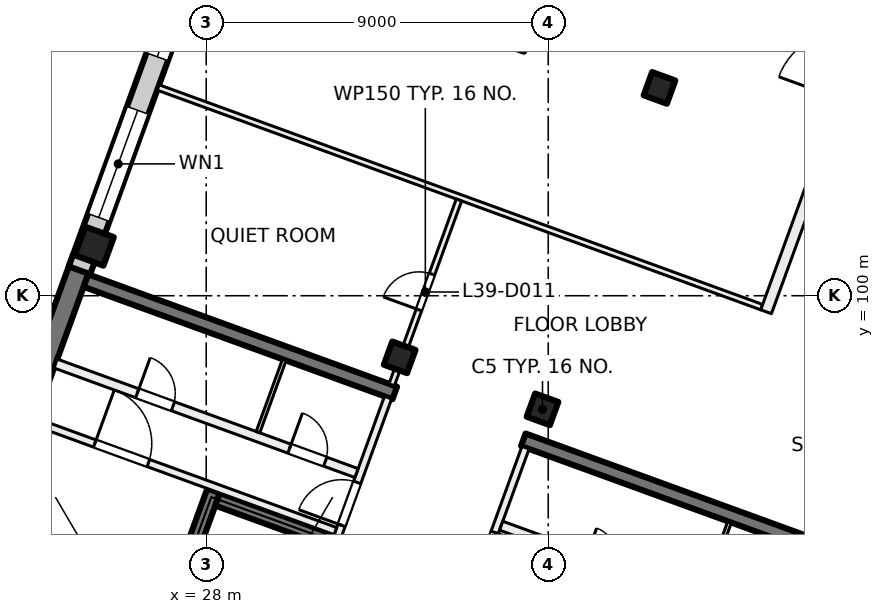
"""IFC4 building model, lengths in metres.
Left out: names, types, materials, properties, quantities, classifications, styles, units other than length and angle.
Written with IfcOpenShell. Run it as: python <this file> out.ifc"""

import sys

from ifc_helpers import new_model, si_unit, direction, frame, frame_2d, origin, origin_2d, place, context, subcontext, project, spatial, rectangle, extrude, element, fill, save


model = new_model("IFC4")
c1 = context("Model", 3, precision=1e-05, world=origin(), true_north=direction((0.0, 1.0)))
c2 = subcontext(c1, "Body", "Model", "MODEL_VIEW")
j1 = project(units=[si_unit("LENGTHUNIT", "METRE"), si_unit("PLANEANGLEUNIT", "RADIAN")], contexts=[c1])
p1 = place(None, origin())
s1 = spatial("IfcSite", under=j1, at=p1, CompositionType="ELEMENT")
p2 = place(p1, origin())
s2 = spatial("IfcBuilding", under=s1, at=p2, CompositionType="ELEMENT")
p3 = place(p2, frame((0.0, 0.0, 166.5)))
s3 = spatial("IfcBuildingStorey", under=s2, at=p3, CompositionType="ELEMENT", Elevation=166.5)
for number, where, z_axis, x_axis in (
    (1, (39.927, 105.468, 0.0), (0.0, 0.0, 1.0), (-0.342, -0.94, 0.0)),
    (2, (36.849, 97.011, 0.0), (0.0, 0.0, 1.0), (-0.342, -0.94, 0.0)),
    (3, (33.091, 98.379, 0.0), (0.0, 0.0, 1.0), (-0.342, -0.94, 0.0)),
):
    element("IfcColumn", number, at=place(p3, frame(where, z_axis=z_axis, x_axis=x_axis)), inside=s3, PredefinedType="COLUMN", context=c2, shape_type="SweptSolid", body=[
        extrude(rectangle(XDim=0.65, YDim=0.65, at=origin_2d()), origin(), (0.0, 0.0, 1.0), 4.0),
    ])
p4 = place(p3, frame((25.056, 101.303, 0.0), z_axis=(0.0, 0.0, 1.0), x_axis=(-0.342020143326, -0.939692620786, 0.0)))
e4 = element("IfcColumn", 4, at=p4, inside=s3, PredefinedType="COLUMN", context=c2, shape_type="SweptSolid", body=[
    extrude(rectangle(XDim=0.8, YDim=0.8, at=origin_2d()), origin(), (0.0, 0.0, 1.0), 4.0),
])
p5 = place(p3, frame((41.85, 85.241, 0.0), z_axis=(0.0, 0.0, 1.0), x_axis=(0.34201902012, 0.939693029598, 0.0)))
e5 = element("IfcWall", 5, at=p5, inside=s3, PredefinedType="SHEAR", context=c2, shape_type="SweptSolid", body=[
    extrude(rectangle(XDim=8.95, YDim=0.55, at=frame_2d((4.475, 0.0))), origin(), (0.0, 0.0, 1.0), 4.0),
])
p6 = place(p3, frame((21.694, 92.577, 0.0), z_axis=(0.0, 0.0, 1.0), x_axis=(0.342010253184, 0.939696220444, 0.0)))
e6 = element("IfcWall", 6, at=p6, inside=s3, PredefinedType="SHEAR", context=c2, shape_type="SweptSolid", body=[
    extrude(rectangle(XDim=8.95, YDim=0.55, at=frame_2d((4.475, 0.0))), origin(), (0.0, 0.0, 1.0), 4.0),
])
p7 = place(p3, frame((27.208, 82.216, 0.0), z_axis=(0.0, 0.0, 1.0), x_axis=(0.34201563943, 0.939694260058, 0.0)))
e7 = element("IfcWall", 7, at=p7, inside=s3, PredefinedType="SHEAR", context=c2, shape_type="SweptSolid", body=[
    extrude(rectangle(XDim=12.225, YDim=0.35, at=frame_2d((6.113, 0.0))), origin(), (0.0, 0.0, 1.0), 4.0),
])
p8 = place(p7, frame((0.7, 0.0, 0.0)))
e8 = element("IfcOpeningElement", 8, at=p8, cuts=e7, PredefinedType="OPENING", context=c2, shape_type="SweptSolid", body=[
    extrude(rectangle(XDim=1.1, YDim=2.1, at=frame_2d((0.55, 1.05))), frame((0.0, 0.185, 0.0), z_axis=(0.0, -1.0, 0.0), x_axis=(1.0, 0.0, 0.0)), (0.0, 0.0, 1.0), 0.37),
])
p9 = place(p7, frame((3.1, 0.0, 0.0)))
e9 = element("IfcOpeningElement", 9, at=p9, cuts=e7, PredefinedType="OPENING", context=c2, shape_type="SweptSolid", body=[
    extrude(rectangle(XDim=1.1, YDim=2.1, at=frame_2d((0.55, 1.05))), frame((0.0, 0.185, 0.0), z_axis=(0.0, -1.0, 0.0), x_axis=(1.0, 0.0, 0.0)), (0.0, 0.0, 1.0), 0.37),
])
p10 = place(p7, frame((5.5, 0.0, 0.0)))
e10 = element("IfcOpeningElement", 10, at=p10, cuts=e7, PredefinedType="OPENING", context=c2, shape_type="SweptSolid", body=[
    extrude(rectangle(XDim=1.1, YDim=2.1, at=frame_2d((0.55, 1.05))), frame((0.0, 0.185, 0.0), z_axis=(0.0, -1.0, 0.0), x_axis=(1.0, 0.0, 0.0)), (0.0, 0.0, 1.0), 0.37),
])
p11 = place(p7, frame((10.3, 0.0, 0.0)))
e11 = element("IfcOpeningElement", 11, at=p11, cuts=e7, PredefinedType="OPENING", context=c2, shape_type="SweptSolid", body=[
    extrude(rectangle(XDim=1.1, YDim=2.1, at=frame_2d((0.55, 1.05))), frame((0.0, 0.185, 0.0), z_axis=(0.0, -1.0, 0.0), x_axis=(1.0, 0.0, 0.0)), (0.0, 0.0, 1.0), 0.37),
])
p12 = place(p3, frame((24.013, 83.379, 0.0), z_axis=(0.0, 0.0, 1.0), x_axis=(0.34201563943, 0.939694260058, 0.0)))
e12 = element("IfcWall", 12, at=p12, inside=s3, PredefinedType="SHEAR", context=c2, shape_type="SweptSolid", body=[
    extrude(rectangle(XDim=12.225, YDim=0.35, at=frame_2d((6.113, 0.0))), origin(), (0.0, 0.0, 1.0), 4.0),
])
p13 = place(p12, frame((7.95, 0.0, 0.0)))
e13 = element("IfcOpeningElement", 13, at=p13, cuts=e12, PredefinedType="OPENING", context=c2, shape_type="SweptSolid", body=[
    extrude(rectangle(XDim=1.1, YDim=2.1, at=frame_2d((0.55, 1.05))), frame((0.0, 0.185, 0.0), z_axis=(0.0, -1.0, 0.0), x_axis=(1.0, 0.0, 0.0)), (0.0, 0.0, 1.0), 0.37),
])
p14 = place(p3, frame((31.165, 93.599, 0.0), z_axis=(0.0, 0.0, 1.0), x_axis=(-0.939683528043, 0.3420451244, 0.0)))
e14 = element("IfcWall", 14, at=p14, inside=s3, PredefinedType="SHEAR", context=c2, shape_type="SweptSolid", body=[
    extrude(rectangle(XDim=3.05, YDim=0.35, at=frame_2d((1.525, 0.0))), origin(), (0.0, 0.0, 1.0), 4.0),
])
p15 = place(p3, frame((44.473, 93.251, 0.0), z_axis=(0.0, 0.0, 1.0), x_axis=(-0.939692847377, 0.34201952077, 0.0)))
e15 = element("IfcWall", 15, at=p15, inside=s3, PredefinedType="SHEAR", context=c2, shape_type="SweptSolid", body=[
    extrude(rectangle(XDim=8.65, YDim=0.35, at=frame_2d((4.325, 0.0))), origin(), (0.0, 0.0, 1.0), 4.0),
])
p16 = place(p3, frame((32.962, 97.441, 0.0), z_axis=(0.0, 0.0, 1.0), x_axis=(-0.939689545667, 0.342028592028, 0.0)))
e16 = element("IfcWall", 16, at=p16, inside=s3, PredefinedType="SHEAR", context=c2, shape_type="SweptSolid", body=[
    extrude(rectangle(XDim=8.65, YDim=0.35, at=frame_2d((4.325, 0.0))), origin(), (0.0, 0.0, 1.0), 4.0),
])
p17 = place(p3, frame((24.666, 100.669, 0.0), z_axis=(0.0, 0.0, 1.0), x_axis=(0.34201964167, 0.939692803373, 0.0)))
e17 = element("IfcWall", 17, at=p17, inside=s3, PredefinedType="SOLIDWALL", context=c2, shape_type="SweptSolid", body=[
    extrude(rectangle(XDim=32.884, YDim=0.6, at=frame_2d((16.442, 0.0))), origin(), (0.0, 0.0, 1.0), 3.625),
])
p18 = place(p17, frame((1.48, 0.0, 0.9)))
e18 = element("IfcOpeningElement", 18, at=p18, cuts=e17, PredefinedType="OPENING", context=c2, shape_type="SweptSolid", body=[
    extrude(rectangle(XDim=3.0, YDim=2.4, at=frame_2d((1.5, 1.2))), frame((0.0, 0.31, 0.0), z_axis=(0.0, -1.0, 0.0), x_axis=(1.0, 0.0, 0.0)), (0.0, 0.0, 1.0), 0.62),
])
p19 = place(p17, frame((5.98, 0.0, 0.9)))
e19 = element("IfcOpeningElement", 19, at=p19, cuts=e17, PredefinedType="OPENING", context=c2, shape_type="SweptSolid", body=[
    extrude(rectangle(XDim=3.0, YDim=2.4, at=frame_2d((1.5, 1.2))), frame((0.0, 0.31, 0.0), z_axis=(0.0, -1.0, 0.0), x_axis=(1.0, 0.0, 0.0)), (0.0, 0.0, 1.0), 0.62),
])
p20 = place(p17, frame((10.48, 0.0, 0.9)))
e20 = element("IfcOpeningElement", 20, at=p20, cuts=e17, PredefinedType="OPENING", context=c2, shape_type="SweptSolid", body=[
    extrude(rectangle(XDim=3.0, YDim=2.4, at=frame_2d((1.5, 1.2))), frame((0.0, 0.31, 0.0), z_axis=(0.0, -1.0, 0.0), x_axis=(1.0, 0.0, 0.0)), (0.0, 0.0, 1.0), 0.62),
])
p21 = place(p17, frame((15.58, 0.0, 0.0)))
e21 = element("IfcOpeningElement", 21, at=p21, cuts=e17, PredefinedType="OPENING", context=c2, shape_type="SweptSolid", body=[
    extrude(rectangle(XDim=1.8, YDim=2.4, at=frame_2d((0.9, 1.2))), frame((0.0, 0.31, 0.0), z_axis=(0.0, -1.0, 0.0), x_axis=(1.0, 0.0, 0.0)), (0.0, 0.0, 1.0), 0.62),
])
p22 = place(p17, frame((19.48, 0.0, 0.9)))
e22 = element("IfcOpeningElement", 22, at=p22, cuts=e17, PredefinedType="OPENING", context=c2, shape_type="SweptSolid", body=[
    extrude(rectangle(XDim=3.0, YDim=2.4, at=frame_2d((1.5, 1.2))), frame((0.0, 0.31, 0.0), z_axis=(0.0, -1.0, 0.0), x_axis=(1.0, 0.0, 0.0)), (0.0, 0.0, 1.0), 0.62),
])
p23 = place(p17, frame((23.98, 0.0, 0.9)))
e23 = element("IfcOpeningElement", 23, at=p23, cuts=e17, PredefinedType="OPENING", context=c2, shape_type="SweptSolid", body=[
    extrude(rectangle(XDim=3.0, YDim=2.4, at=frame_2d((1.5, 1.2))), frame((0.0, 0.31, 0.0), z_axis=(0.0, -1.0, 0.0), x_axis=(1.0, 0.0, 0.0)), (0.0, 0.0, 1.0), 0.62),
])
p24 = place(p17, frame((29.08, 0.0, 0.0)))
e24 = element("IfcOpeningElement", 24, at=p24, cuts=e17, PredefinedType="OPENING", context=c2, shape_type="SweptSolid", body=[
    extrude(rectangle(XDim=1.8, YDim=2.4, at=frame_2d((0.9, 1.2))), frame((0.0, 0.31, 0.0), z_axis=(0.0, -1.0, 0.0), x_axis=(1.0, 0.0, 0.0)), (0.0, 0.0, 1.0), 0.62),
])
p25 = place(p3, frame((31.459, 93.678, 0.0), z_axis=(0.0, 0.0, 1.0), x_axis=(0.341985870128, 0.939705094502, 0.0)))
e25 = element("IfcWall", 25, at=p25, inside=s3, PredefinedType="PARTITIONING", context=c2, shape_type="SweptSolid", body=[
    extrude(rectangle(XDim=3.875, YDim=0.2, at=frame_2d((1.938, 0.0))), origin(), (0.0, 0.0, 1.0), 3.625),
])
p26 = place(p25, frame((0.3, 0.0, 0.0)))
e26 = element("IfcOpeningElement", 26, at=p26, cuts=e25, PredefinedType="OPENING", context=c2, shape_type="SweptSolid", body=[
    extrude(rectangle(XDim=1.2, YDim=2.1, at=frame_2d((0.6, 1.05))), frame((0.0, 0.11, 0.0), z_axis=(0.0, -1.0, 0.0), x_axis=(1.0, 0.0, 0.0)), (0.0, 0.0, 1.0), 0.22),
])
p27 = place(p3, frame((23.483, 96.688, 0.0), z_axis=(0.0, 0.0, 1.0), x_axis=(0.939691007314, -0.342024576271, 0.0)))
e27 = element("IfcWall", 27, at=p27, inside=s3, PredefinedType="PARTITIONING", context=c2, shape_type="SweptSolid", body=[
    extrude(rectangle(XDim=8.425, YDim=0.2, at=frame_2d((4.212, 0.0))), origin(), (0.0, 0.0, 1.0), 3.625),
])
p28 = place(p27, frame((1.688, 0.0, 0.0)))
e28 = element("IfcOpeningElement", 28, at=p28, cuts=e27, PredefinedType="OPENING", context=c2, shape_type="SweptSolid", body=[
    extrude(rectangle(XDim=1.5, YDim=2.1, at=frame_2d((0.75, 1.05))), frame((0.0, 0.11, 0.0), z_axis=(0.0, -1.0, 0.0), x_axis=(1.0, 0.0, 0.0)), (0.0, 0.0, 1.0), 0.22),
])
p29 = place(p3, frame((24.039, 98.215, 0.0), z_axis=(0.0, 0.0, 1.0), x_axis=(0.939687617333, -0.342033889887, 0.0)))
e29 = element("IfcWall", 29, at=p29, inside=s3, PredefinedType="PARTITIONING", context=c2, shape_type="SweptSolid", body=[
    extrude(rectangle(XDim=8.425, YDim=0.25, at=frame_2d((4.212, 0.0))), origin(), (0.0, 0.0, 1.0), 3.625),
])
p30 = place(p29, frame((6.548, 0.0, 0.0)))
e30 = element("IfcOpeningElement", 30, at=p30, cuts=e29, PredefinedType="OPENING", context=c2, shape_type="SweptSolid", body=[
    extrude(rectangle(XDim=1.0, YDim=2.1, at=frame_2d((0.5, 1.05))), frame((0.0, 0.135, 0.0), z_axis=(0.0, -1.0, 0.0), x_axis=(1.0, 0.0, 0.0)), (0.0, 0.0, 1.0), 0.27),
])
p31 = place(p29, frame((2.285, 0.0, 0.0)))
e31 = element("IfcOpeningElement", 31, at=p31, cuts=e29, PredefinedType="OPENING", context=c2, shape_type="SweptSolid", body=[
    extrude(rectangle(XDim=1.0, YDim=2.1, at=frame_2d((0.5, 1.05))), frame((0.0, 0.135, 0.0), z_axis=(0.0, -1.0, 0.0), x_axis=(1.0, 0.0, 0.0)), (0.0, 0.0, 1.0), 0.27),
])
p32 = place(p3, frame((29.362, 96.41, 0.0), z_axis=(0.0, 0.0, 1.0), x_axis=(0.342043138314, 0.939684250976, 0.0)))
e32 = element("IfcWall", 32, at=p32, inside=s3, PredefinedType="PARTITIONING", context=c2, shape_type="SweptSolid", body=[
    extrude(rectangle(XDim=2.025, YDim=0.1, at=frame_2d((1.012, 0.0))), origin(), (0.0, 0.0, 1.0), 3.625),
])
p33 = place(p3, frame((36.403, 96.003, 0.0), z_axis=(0.0, 0.0, 1.0), x_axis=(-0.342041503764, -0.939684845947, 0.0)))
e33 = element("IfcWall", 33, at=p33, inside=s3, PredefinedType="PARTITIONING", context=c2, shape_type="SweptSolid", body=[
    extrude(rectangle(XDim=3.875, YDim=0.2, at=frame_2d((1.938, 0.0))), origin(), (0.0, 0.0, 1.0), 3.625),
])
p34 = place(p33, frame((2.375, 0.0, 0.0)))
e34 = element("IfcOpeningElement", 34, at=p34, cuts=e33, PredefinedType="OPENING", context=c2, shape_type="SweptSolid", body=[
    extrude(rectangle(XDim=1.2, YDim=2.1, at=frame_2d((0.6, 1.05))), frame((0.0, 0.11, 0.0), z_axis=(0.0, -1.0, 0.0), x_axis=(1.0, 0.0, 0.0)), (0.0, 0.0, 1.0), 0.22),
])
p35 = place(p3, frame((35.761, 93.948, 0.0), z_axis=(0.0, 0.0, 1.0), x_axis=(0.93969693093, -0.342008301071, 0.0)))
e35 = element("IfcWall", 35, at=p35, inside=s3, PredefinedType="PARTITIONING", context=c2, shape_type="SweptSolid", body=[
    extrude(rectangle(XDim=8.425, YDim=0.25, at=frame_2d((4.212, 0.0))), origin(), (0.0, 0.0, 1.0), 3.625),
])
p36 = place(p35, frame((2.383, 0.0, 0.0)))
e36 = element("IfcOpeningElement", 36, at=p36, cuts=e35, PredefinedType="OPENING", context=c2, shape_type="SweptSolid", body=[
    extrude(rectangle(XDim=0.8, YDim=2.1, at=frame_2d((0.4, 1.05))), frame((0.0, 0.135, 0.0), z_axis=(0.0, -1.0, 0.0), x_axis=(1.0, 0.0, 0.0)), (0.0, 0.0, 1.0), 0.27),
])
p37 = place(p35, frame((6.645, 0.0, 0.0)))
e37 = element("IfcOpeningElement", 37, at=p37, cuts=e35, PredefinedType="OPENING", context=c2, shape_type="SweptSolid", body=[
    extrude(rectangle(XDim=0.8, YDim=2.1, at=frame_2d((0.4, 1.05))), frame((0.0, 0.135, 0.0), z_axis=(0.0, -1.0, 0.0), x_axis=(1.0, 0.0, 0.0)), (0.0, 0.0, 1.0), 0.27),
])
p38 = place(p3, frame((41.773, 94.048, 0.0), z_axis=(0.0, 0.0, 1.0), x_axis=(-0.342043138314, -0.939684250976, 0.0)))
e38 = element("IfcWall", 38, at=p38, inside=s3, PredefinedType="PARTITIONING", context=c2, shape_type="SweptSolid", body=[
    extrude(rectangle(XDim=2.025, YDim=0.1, at=frame_2d((1.012, 0.0))), origin(), (0.0, 0.0, 1.0), 3.625),
])
p39 = place(p3, frame((26.736, 105.48, 0.0), z_axis=(0.0, 0.0, 1.0), x_axis=(0.939695108427, -0.342013308511, 0.0)))
e39 = element("IfcWall", 39, at=p39, inside=s3, PredefinedType="PARTITIONING", context=c2, shape_type="SweptSolid", body=[
    extrude(rectangle(XDim=16.9, YDim=0.15, at=frame_2d((8.45, 0.0))), origin(), (0.0, 0.0, 1.0), 3.625),
])
p40 = place(p3, frame((32.881, 97.657, 0.0), z_axis=(0.0, 0.0, 1.0), x_axis=(0.341981688871, 0.939706616172, 0.0)))
e40 = element("IfcWall", 40, at=p40, inside=s3, PredefinedType="PARTITIONING", context=c2, shape_type="SweptSolid", body=[
    extrude(rectangle(XDim=5.175, YDim=0.15, at=frame_2d((2.587, 0.0))), origin(), (0.0, 0.0, 1.0), 3.625),
])
p41 = place(p40, frame((2.098, 0.0, 0.0)))
e41 = element("IfcOpeningElement", 41, at=p41, cuts=e40, PredefinedType="OPENING", context=c2, shape_type="SweptSolid", body=[
    extrude(rectangle(XDim=1.0, YDim=2.1, at=frame_2d((0.5, 1.05))), frame((0.0, 0.085, 0.0), z_axis=(0.0, -1.0, 0.0), x_axis=(1.0, 0.0, 0.0)), (0.0, 0.0, 1.0), 0.17),
])
p42 = place(p3, frame((42.732, 99.579, 0.0), z_axis=(0.0, 0.0, 1.0), x_axis=(0.342036653044, 0.939686611576, 0.0)))
e42 = element("IfcWall", 42, at=p42, inside=s3, PredefinedType="PARTITIONING", context=c2, shape_type="SweptSolid", body=[
    extrude(rectangle(XDim=23.167, YDim=0.3, at=frame_2d((11.583, 0.0))), origin(), (0.0, 0.0, 1.0), 3.625),
])
p43 = place(p42, frame((15.225, 0.0, 0.0)))
e43 = element("IfcOpeningElement", 43, at=p43, cuts=e42, PredefinedType="OPENING", context=c2, shape_type="SweptSolid", body=[
    extrude(rectangle(XDim=1.2, YDim=2.1, at=frame_2d((0.6, 1.05))), frame((0.0, 0.16, 0.0), z_axis=(0.0, -1.0, 0.0), x_axis=(1.0, 0.0, 0.0)), (0.0, 0.0, 1.0), 0.32),
])
p44 = place(p42, frame((19.725, 0.0, 0.0)))
e44 = element("IfcOpeningElement", 44, at=p44, cuts=e42, PredefinedType="OPENING", context=c2, shape_type="SweptSolid", body=[
    extrude(rectangle(XDim=1.2, YDim=2.1, at=frame_2d((0.6, 1.05))), frame((0.0, 0.16, 0.0), z_axis=(0.0, -1.0, 0.0), x_axis=(1.0, 0.0, 0.0)), (0.0, 0.0, 1.0), 0.32),
])
p45 = place(p42, frame((5.925, 0.0, 0.0)))
e45 = element("IfcOpeningElement", 45, at=p45, cuts=e42, PredefinedType="OPENING", context=c2, shape_type="SweptSolid", body=[
    extrude(rectangle(XDim=1.8, YDim=2.1, at=frame_2d((0.9, 1.05))), frame((0.0, 0.16, 0.0), z_axis=(0.0, -1.0, 0.0), x_axis=(1.0, 0.0, 0.0)), (0.0, 0.0, 1.0), 0.32),
])
p46 = place(p18, origin())
e46 = element("IfcWindow", 46, at=p46, inside=s3, PartitioningType="SINGLE_PANEL", PredefinedType="WINDOW", context=c2, shape_type="SweptSolid", body=[
    extrude(rectangle(XDim=3.0, YDim=2.4, at=frame_2d((1.5, 1.2))), frame((0.0, 0.03, 0.0), z_axis=(0.0, -1.0, 0.0), x_axis=(1.0, 0.0, 0.0)), (0.0, 0.0, 1.0), 0.06),
])
fill(e18, e46)
p47 = place(p19, origin())
e47 = element("IfcWindow", 47, at=p47, inside=s3, PartitioningType="SINGLE_PANEL", PredefinedType="WINDOW", context=c2, shape_type="SweptSolid", body=[
    extrude(rectangle(XDim=3.0, YDim=2.4, at=frame_2d((1.5, 1.2))), frame((0.0, 0.03, 0.0), z_axis=(0.0, -1.0, 0.0), x_axis=(1.0, 0.0, 0.0)), (0.0, 0.0, 1.0), 0.06),
])
fill(e19, e47)
p48 = place(p26, origin())
e48 = element("IfcDoor", 48, at=p48, inside=s3, OperationType="DOUBLE_DOOR_SINGLE_SWING", PredefinedType="DOOR", context=c2, shape_type="SweptSolid", body=[
    extrude(rectangle(XDim=1.2, YDim=2.1, at=frame_2d((0.6, 1.05))), frame((0.0, 0.025, 0.0), z_axis=(0.0, -1.0, 0.0), x_axis=(1.0, 0.0, 0.0)), (0.0, 0.0, 1.0), 0.05),
])
fill(e26, e48)
p49 = place(p28, origin())
e49 = element("IfcDoor", 49, at=p49, inside=s3, OperationType="DOUBLE_DOOR_SINGLE_SWING", PredefinedType="DOOR", context=c2, shape_type="SweptSolid", body=[
    extrude(rectangle(XDim=1.5, YDim=2.1, at=frame_2d((0.75, 1.05))), frame((0.0, 0.025, 0.0), z_axis=(0.0, -1.0, 0.0), x_axis=(1.0, 0.0, 0.0)), (0.0, 0.0, 1.0), 0.05),
])
fill(e28, e49)
p50 = place(p30, origin())
e50 = element("IfcDoor", 50, at=p50, inside=s3, OperationType="SINGLE_SWING_LEFT", PredefinedType="DOOR", context=c2, shape_type="SweptSolid", body=[
    extrude(rectangle(XDim=1.0, YDim=2.1, at=frame_2d((0.5, 1.05))), frame((0.0, 0.025, 0.0), z_axis=(0.0, -1.0, 0.0), x_axis=(1.0, 0.0, 0.0)), (0.0, 0.0, 1.0), 0.05),
])
fill(e30, e50)
p51 = place(p31, origin())
e51 = element("IfcDoor", 51, at=p51, inside=s3, OperationType="SINGLE_SWING_RIGHT", PredefinedType="DOOR", context=c2, shape_type="SweptSolid", body=[
    extrude(rectangle(XDim=1.0, YDim=2.1, at=frame_2d((0.5, 1.05))), frame((0.0, 0.025, 0.0), z_axis=(0.0, -1.0, 0.0), x_axis=(1.0, 0.0, 0.0)), (0.0, 0.0, 1.0), 0.05),
])
fill(e31, e51)
p52 = place(p34, origin())
e52 = element("IfcDoor", 52, at=p52, inside=s3, OperationType="DOUBLE_DOOR_SINGLE_SWING", PredefinedType="DOOR", context=c2, shape_type="SweptSolid", body=[
    extrude(rectangle(XDim=1.2, YDim=2.1, at=frame_2d((0.6, 1.05))), frame((0.0, 0.025, 0.0), z_axis=(0.0, -1.0, 0.0), x_axis=(1.0, 0.0, 0.0)), (0.0, 0.0, 1.0), 0.05),
])
fill(e34, e52)
p53 = place(p41, origin())
e53 = element("IfcDoor", 53, at=p53, inside=s3, OperationType="SINGLE_SWING_LEFT", PredefinedType="DOOR", context=c2, shape_type="SweptSolid", body=[
    extrude(rectangle(XDim=1.0, YDim=2.1, at=frame_2d((0.5, 1.05))), frame((0.0, 0.025, 0.0), z_axis=(0.0, -1.0, 0.0), x_axis=(1.0, 0.0, 0.0)), (0.0, 0.0, 1.0), 0.05),
])
fill(e41, e53)
save(model, sys.argv[1])
